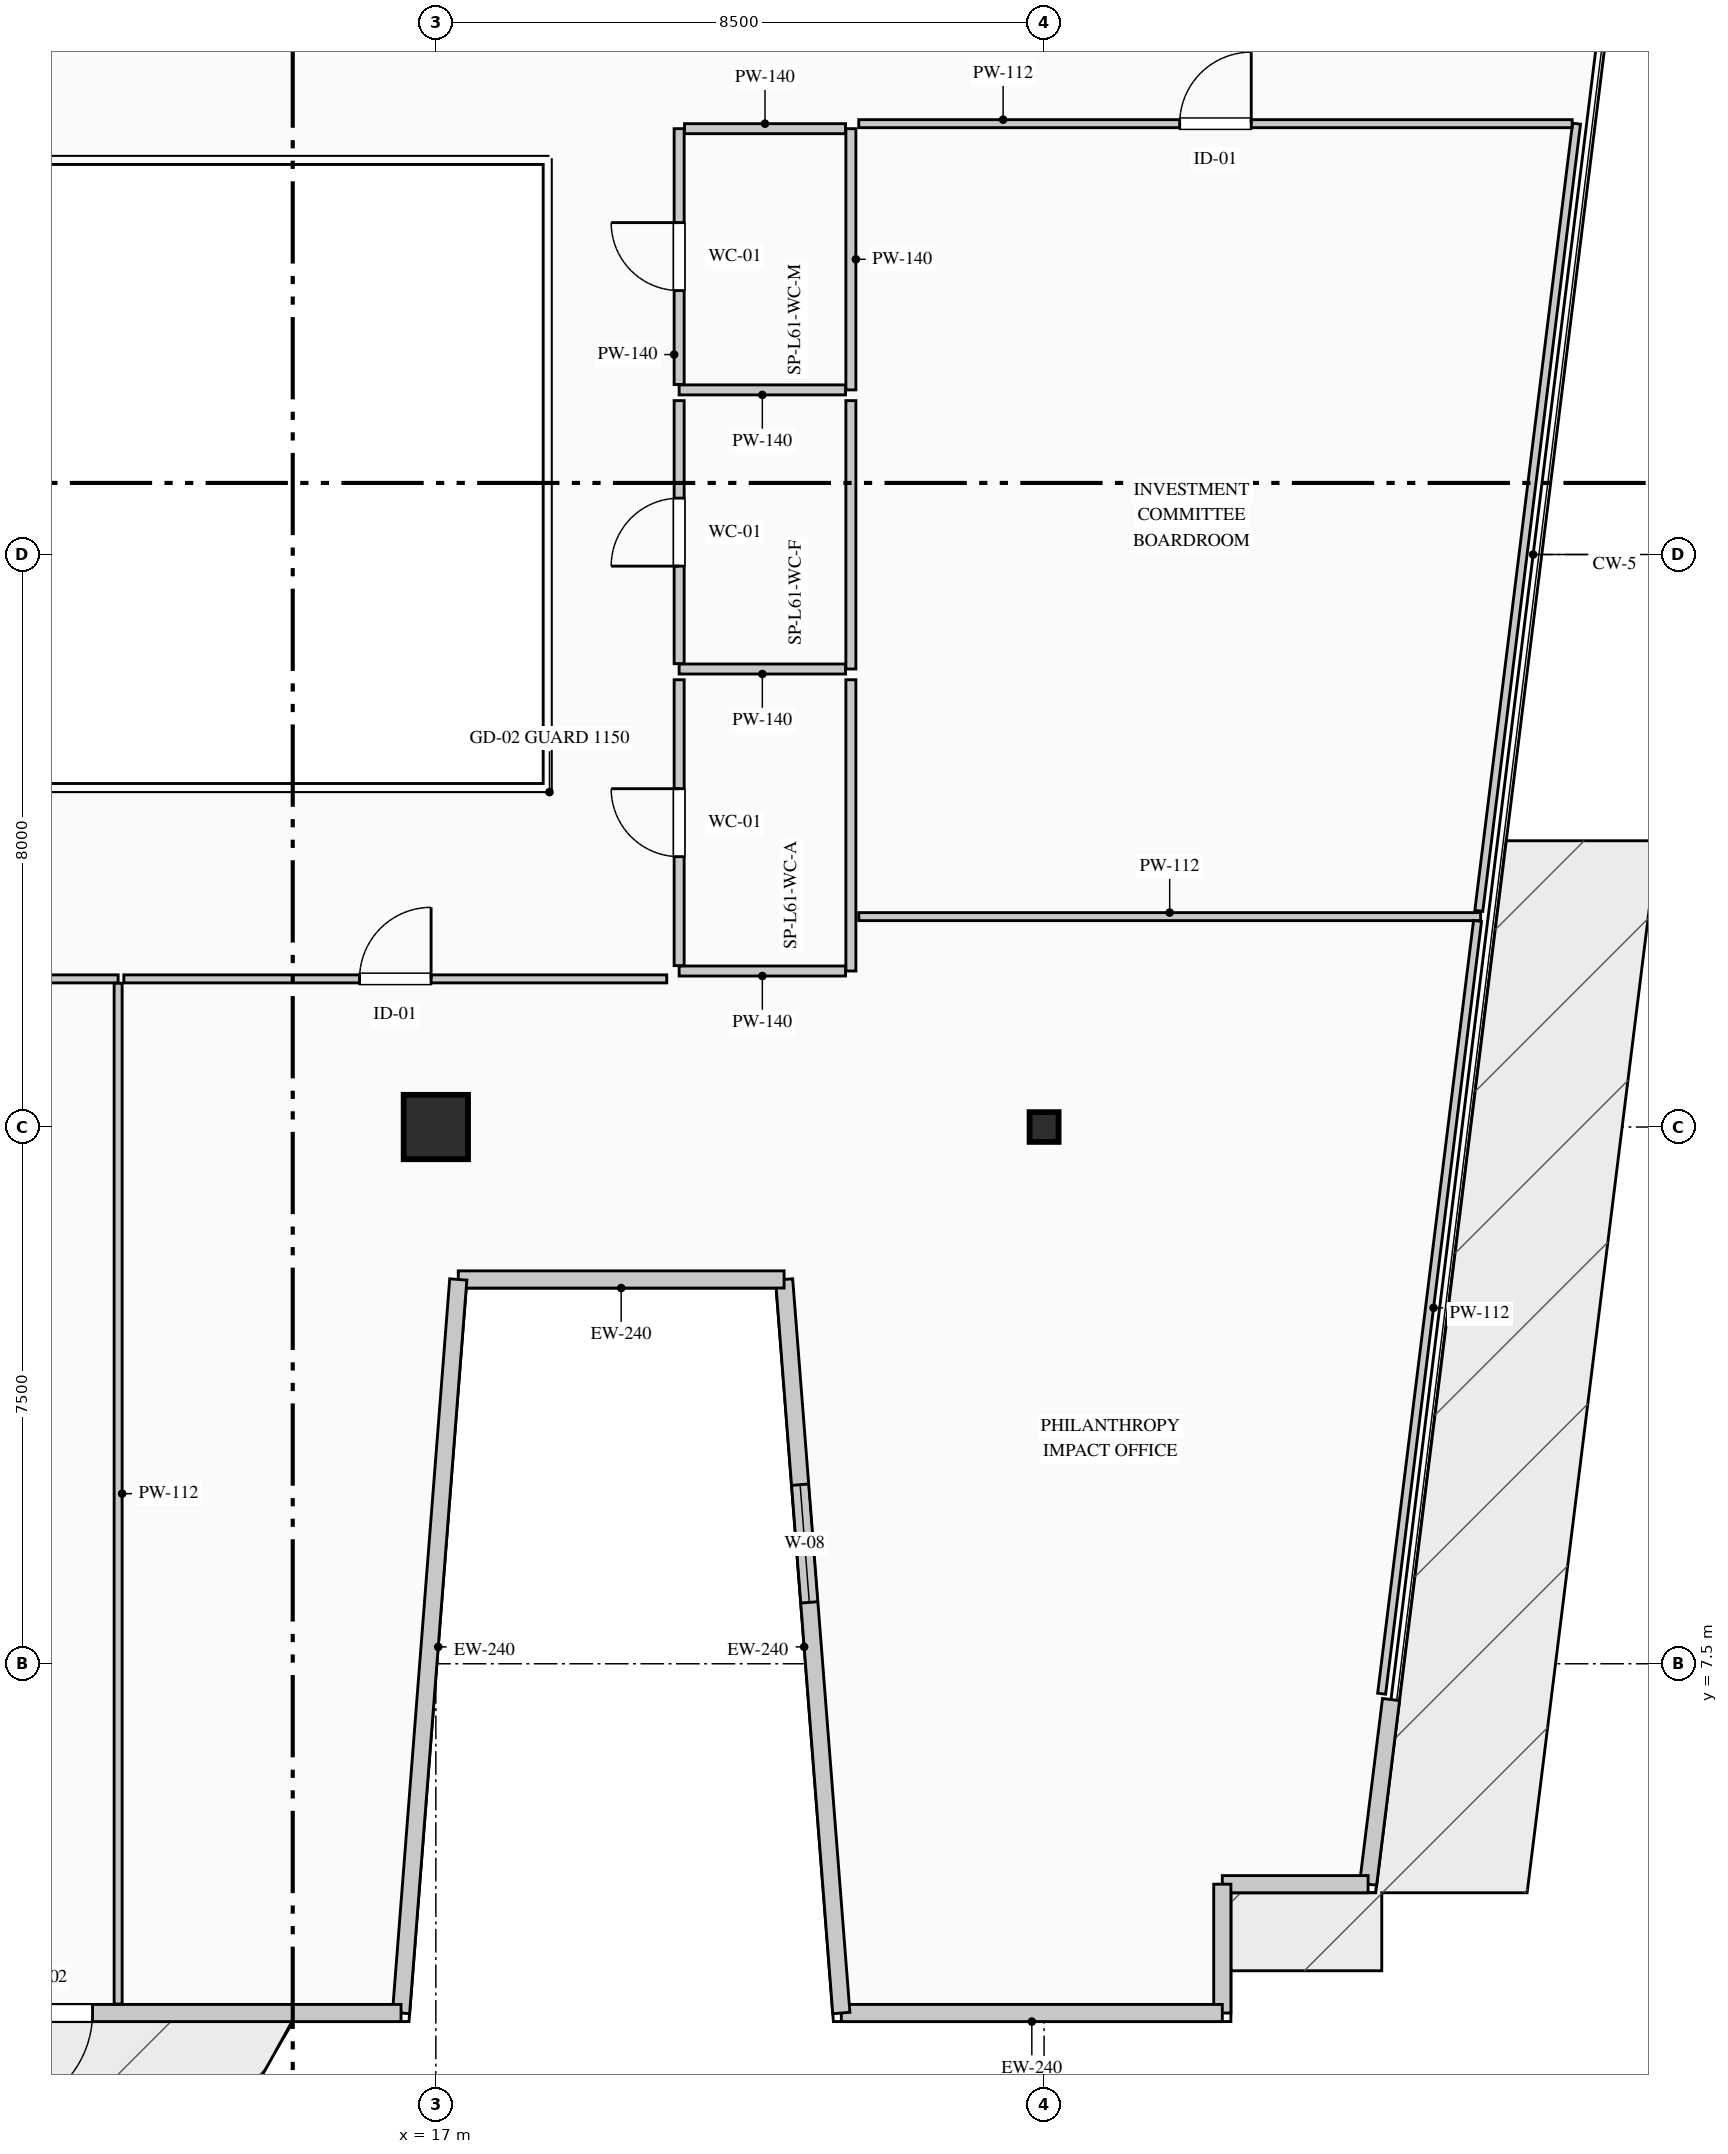
"""IFC4 building model, lengths in metres.
Left out: names, types, materials, properties, quantities, classifications, styles, units other than length and angle.
Written with IfcOpenShell. Run it as: python <this file> out.ifc"""

import sys

from ifc_helpers import new_model, si_unit, direction, frame, frame_2d, origin, origin_2d, place, context, subcontext, project, spatial, rectangle, i_section, extrude, element, fill, save


model = new_model("IFC4")
c1 = context("Model", 3, precision=1e-05, world=origin(), true_north=direction((0.0, 1.0)))
c2 = subcontext(c1, "Body", "Model", "MODEL_VIEW")
j1 = project(units=[si_unit("LENGTHUNIT", "METRE"), si_unit("PLANEANGLEUNIT", "RADIAN")], contexts=[c1])
p1 = place(None, origin())
s1 = spatial("IfcSite", under=j1, at=p1, CompositionType="ELEMENT")
p2 = place(p1, origin())
s2 = spatial("IfcBuilding", under=s1, at=p2, CompositionType="ELEMENT")
p3 = place(p2, frame((0.0, 0.0, 256.7)))
s3 = spatial("IfcBuildingStorey", under=s2, at=p3, CompositionType="ELEMENT", Elevation=256.7)
p4 = place(p3, frame((17.0, 15.0, 0.0), z_axis=(0.0, 0.0, 1.0), x_axis=(1.0, 0.0, 0.0)))
e1 = element("IfcColumn", 1, at=p4, inside=s3, PredefinedType="COLUMN", context=c2, shape_type="SweptSolid", body=[
    extrude(rectangle(XDim=0.9, YDim=0.9, at=origin_2d()), origin(), (0.0, 0.0, 1.0), 3.95),
])
p5 = place(p3, frame((25.5, 15.0, 0.0), z_axis=(0.0, 0.0, 1.0), x_axis=(1.0, 0.0, 0.0)))
e2 = element("IfcColumn", 2, at=p5, inside=s3, PredefinedType="COLUMN", context=c2, shape_type="SweptSolid", body=[
    extrude(i_section(OverallWidth=0.406, OverallDepth=0.416, WebThickness=0.03, FlangeThickness=0.048, FilletRadius=0.015, at=origin_2d()), origin(), (0.0, 0.0, 1.0), 3.95),
])
p6 = place(p3, frame((30.348, 7.0, 0.0), z_axis=(0.0, 0.0, 1.0), x_axis=(-0.123191073593, -0.992382970121, 0.0)))
e3 = element("IfcWall", 3, at=p6, inside=s3, PredefinedType="STANDARD", context=c2, shape_type="SweptSolid", body=[
    extrude(rectangle(XDim=2.6, YDim=0.24, at=frame_2d((1.3, 0.0))), origin(), (0.0, 0.0, 1.0), 3.7),
])
p7 = place(p3, frame((30.028, 4.42, 0.0), z_axis=(0.0, 0.0, 1.0), x_axis=(-1.0, 0.0, 0.0)))
e4 = element("IfcWall", 4, at=p7, inside=s3, PredefinedType="STANDARD", context=c2, shape_type="SweptSolid", body=[
    extrude(rectangle(XDim=2.037, YDim=0.24, at=frame_2d((1.019, 0.0))), origin(), (0.0, 0.0, 1.0), 3.7),
])
p8 = place(p3, frame((27.99, 4.42, 0.0), z_axis=(0.0, 0.0, 1.0), x_axis=(0.0, -1.0, 0.0)))
e5 = element("IfcWall", 5, at=p8, inside=s3, PredefinedType="STANDARD", context=c2, shape_type="SweptSolid", body=[
    extrude(rectangle(XDim=1.8, YDim=0.24, at=frame_2d((0.9, 0.0))), origin(), (0.0, 0.0, 1.0), 3.7),
])
p9 = place(p3, frame((27.99, 2.62, 0.0), z_axis=(0.0, 0.0, 1.0), x_axis=(-1.0, 0.0, 0.0)))
e6 = element("IfcWall", 6, at=p9, inside=s3, PredefinedType="STANDARD", context=c2, shape_type="SweptSolid", body=[
    extrude(rectangle(XDim=5.324, YDim=0.24, at=frame_2d((2.662, 0.0))), origin(), (0.0, 0.0, 1.0), 3.7),
])
p10 = place(p3, frame((22.667, 2.62, 0.0), z_axis=(0.0, 0.0, 1.0), x_axis=(-0.077816860153, 0.996967670627, 0.0)))
e7 = element("IfcWall", 7, at=p10, inside=s3, PredefinedType="STANDARD", context=c2, shape_type="SweptSolid", body=[
    extrude(rectangle(XDim=10.281, YDim=0.24, at=frame_2d((5.141, 0.0))), origin(), (0.0, 0.0, 1.0), 3.7),
])
p11 = place(p10, frame((5.755, 0.0, 0.9)))
e8 = element("IfcOpeningElement", 8, at=p11, cuts=e7, PredefinedType="OPENING", context=c2, shape_type="SweptSolid", body=[
    extrude(rectangle(XDim=1.65, YDim=1.95, at=frame_2d((0.825, 0.975))), frame((0.0, 0.13, 0.0), z_axis=(0.0, -1.0, 0.0), x_axis=(1.0, 0.0, 0.0)), (0.0, 0.0, 1.0), 0.26),
])
p12 = place(p3, frame((21.867, 12.87, 0.0), z_axis=(0.0, 0.0, 1.0), x_axis=(-1.0, 0.0, 0.0)))
e9 = element("IfcWall", 9, at=p12, inside=s3, PredefinedType="STANDARD", context=c2, shape_type="SweptSolid", body=[
    extrude(rectangle(XDim=4.553, YDim=0.24, at=frame_2d((2.277, 0.0))), origin(), (0.0, 0.0, 1.0), 3.7),
])
p13 = place(p3, frame((17.313, 12.87, 0.0), z_axis=(0.0, 0.0, 1.0), x_axis=(-0.077816860153, -0.996967670627, 0.0)))
e10 = element("IfcWall", 10, at=p13, inside=s3, PredefinedType="STANDARD", context=c2, shape_type="SweptSolid", body=[
    extrude(rectangle(XDim=10.281, YDim=0.24, at=frame_2d((5.141, 0.0))), origin(), (0.0, 0.0, 1.0), 3.7),
])
p14 = place(p3, frame((16.513, 2.62, 0.0), z_axis=(0.0, 0.0, 1.0), x_axis=(-1.0, 0.0, 0.0)))
e11 = element("IfcWall", 11, at=p14, inside=s3, PredefinedType="STANDARD", context=c2, shape_type="SweptSolid", body=[
    extrude(rectangle(XDim=8.408, YDim=0.24, at=frame_2d((4.204, 0.0))), origin(), (0.0, 0.0, 1.0), 3.7),
])
p15 = place(p14, frame((4.311, 0.0, 0.0)))
e12 = element("IfcOpeningElement", 12, at=p15, cuts=e11, PredefinedType="OPENING", context=c2, shape_type="SweptSolid", body=[
    extrude(rectangle(XDim=1.4, YDim=2.2, at=frame_2d((0.7, 1.1))), frame((0.0, 0.13, 0.0), z_axis=(0.0, -1.0, 0.0), x_axis=(1.0, 0.0, 0.0)), (0.0, 0.0, 1.0), 0.26),
])
p16 = place(p3, frame((22.8, 28.95, 0.0), z_axis=(0.0, 0.0, 1.0), x_axis=(0.0, -1.0, 0.0)))
e13 = element("IfcWall", 13, at=p16, inside=s3, PredefinedType="PARTITIONING", context=c2, shape_type="SweptSolid", body=[
    extrude(rectangle(XDim=3.65, YDim=0.14, at=frame_2d((1.825, 0.0))), origin(), (0.0, 0.0, 1.0), 3.385),
])
p17 = place(p3, frame((22.725, 25.3, 0.0), z_axis=(0.0, 0.0, 1.0), x_axis=(-1.0, 0.0, 0.0)))
e14 = element("IfcWall", 14, at=p17, inside=s3, PredefinedType="PARTITIONING", context=c2, shape_type="SweptSolid", body=[
    extrude(rectangle(XDim=2.325, YDim=0.14, at=frame_2d((1.163, 0.0))), origin(), (0.0, 0.0, 1.0), 3.7),
])
p18 = place(p3, frame((20.4, 25.375, 0.0), z_axis=(0.0, 0.0, 1.0), x_axis=(0.0, 1.0, 0.0)))
e15 = element("IfcWall", 15, at=p18, inside=s3, PredefinedType="PARTITIONING", context=c2, shape_type="SweptSolid", body=[
    extrude(rectangle(XDim=3.575, YDim=0.14, at=frame_2d((1.788, 0.0))), origin(), (0.0, 0.0, 1.0), 3.7),
])
p19 = place(p18, frame((1.312, 0.0, 0.0)))
e16 = element("IfcOpeningElement", 16, at=p19, cuts=e15, PredefinedType="OPENING", context=c2, shape_type="SweptSolid", body=[
    extrude(rectangle(XDim=0.95, YDim=2.15, at=frame_2d((0.475, 1.075))), frame((0.0, 0.08, 0.0), z_axis=(0.0, -1.0, 0.0), x_axis=(1.0, 0.0, 0.0)), (0.0, 0.0, 1.0), 0.16),
])
p20 = place(p3, frame((20.475, 28.95, 0.0), z_axis=(0.0, 0.0, 1.0), x_axis=(1.0, 0.0, 0.0)))
e17 = element("IfcWall", 17, at=p20, inside=s3, PredefinedType="PARTITIONING", context=c2, shape_type="SweptSolid", body=[
    extrude(rectangle(XDim=2.25, YDim=0.14, at=frame_2d((1.125, 0.0))), origin(), (0.0, 0.0, 1.0), 3.7),
])
p21 = place(p3, frame((22.8, 25.15, 0.0), z_axis=(0.0, 0.0, 1.0), x_axis=(0.0, -1.0, 0.0)))
e18 = element("IfcWall", 18, at=p21, inside=s3, PredefinedType="PARTITIONING", context=c2, shape_type="SweptSolid", body=[
    extrude(rectangle(XDim=3.75, YDim=0.14, at=frame_2d((1.875, 0.0))), origin(), (0.0, 0.0, 1.0), 3.385),
])
p22 = place(p3, frame((22.725, 21.4, 0.0), z_axis=(0.0, 0.0, 1.0), x_axis=(-1.0, 0.0, 0.0)))
e19 = element("IfcWall", 19, at=p22, inside=s3, PredefinedType="PARTITIONING", context=c2, shape_type="SweptSolid", body=[
    extrude(rectangle(XDim=2.325, YDim=0.14, at=frame_2d((1.163, 0.0))), origin(), (0.0, 0.0, 1.0), 3.7),
])
p23 = place(p3, frame((20.4, 21.475, 0.0), z_axis=(0.0, 0.0, 1.0), x_axis=(0.0, 1.0, 0.0)))
e20 = element("IfcWall", 20, at=p23, inside=s3, PredefinedType="PARTITIONING", context=c2, shape_type="SweptSolid", body=[
    extrude(rectangle(XDim=3.675, YDim=0.14, at=frame_2d((1.837, 0.0))), origin(), (0.0, 0.0, 1.0), 3.7),
])
p24 = place(p23, frame((1.363, 0.0, 0.0)))
e21 = element("IfcOpeningElement", 21, at=p24, cuts=e20, PredefinedType="OPENING", context=c2, shape_type="SweptSolid", body=[
    extrude(rectangle(XDim=0.95, YDim=2.15, at=frame_2d((0.475, 1.075))), frame((0.0, 0.08, 0.0), z_axis=(0.0, -1.0, 0.0), x_axis=(1.0, 0.0, 0.0)), (0.0, 0.0, 1.0), 0.16),
])
p25 = place(p3, frame((22.8, 21.25, 0.0), z_axis=(0.0, 0.0, 1.0), x_axis=(0.0, -1.0, 0.0)))
e22 = element("IfcWall", 22, at=p25, inside=s3, PredefinedType="PARTITIONING", context=c2, shape_type="SweptSolid", body=[
    extrude(rectangle(XDim=4.07, YDim=0.14, at=frame_2d((2.035, 0.0))), origin(), (0.0, 0.0, 1.0), 3.385),
])
p26 = place(p3, frame((22.725, 17.18, 0.0), z_axis=(0.0, 0.0, 1.0), x_axis=(-1.0, 0.0, 0.0)))
e23 = element("IfcWall", 23, at=p26, inside=s3, PredefinedType="PARTITIONING", context=c2, shape_type="SweptSolid", body=[
    extrude(rectangle(XDim=2.325, YDim=0.14, at=frame_2d((1.163, 0.0))), origin(), (0.0, 0.0, 1.0), 3.7),
])
p27 = place(p3, frame((20.4, 17.255, 0.0), z_axis=(0.0, 0.0, 1.0), x_axis=(0.0, 1.0, 0.0)))
e24 = element("IfcWall", 24, at=p27, inside=s3, PredefinedType="PARTITIONING", context=c2, shape_type="SweptSolid", body=[
    extrude(rectangle(XDim=3.995, YDim=0.14, at=frame_2d((1.998, 0.0))), origin(), (0.0, 0.0, 1.0), 3.7),
])
p28 = place(p27, frame((1.522, 0.0, 0.0)))
e25 = element("IfcOpeningElement", 25, at=p28, cuts=e24, PredefinedType="OPENING", context=c2, shape_type="SweptSolid", body=[
    extrude(rectangle(XDim=0.95, YDim=2.15, at=frame_2d((0.475, 1.075))), frame((0.0, 0.08, 0.0), z_axis=(0.0, -1.0, 0.0), x_axis=(1.0, 0.0, 0.0)), (0.0, 0.0, 1.0), 0.16),
])
p29 = place(p3, frame((5.122, 17.07, 0.0), z_axis=(0.0, 0.0, 1.0), x_axis=(1.0, 0.0, 0.0)))
e26 = element("IfcWall", 26, at=p29, inside=s3, PredefinedType="PARTITIONING", context=c2, shape_type="SweptSolid", body=[
    extrude(rectangle(XDim=7.438, YDim=0.112, at=frame_2d((3.719, 0.0))), origin(), (0.0, 0.0, 1.0), 3.7),
])
p30 = place(p29, frame((3.219, 0.0, 0.0)))
e27 = element("IfcOpeningElement", 27, at=p30, cuts=e26, PredefinedType="OPENING", context=c2, shape_type="SweptSolid", body=[
    extrude(rectangle(XDim=1.0, YDim=2.15, at=frame_2d((0.5, 1.075))), frame((0.0, 0.066, 0.0), z_axis=(0.0, -1.0, 0.0), x_axis=(1.0, 0.0, 0.0)), (0.0, 0.0, 1.0), 0.132),
])
p31 = place(p3, frame((12.56, 17.009, 0.0), z_axis=(0.0, 0.0, 1.0), x_axis=(0.0, -1.0, 0.0)))
e28 = element("IfcWall", 28, at=p31, inside=s3, PredefinedType="PARTITIONING", context=c2, shape_type="SweptSolid", body=[
    extrude(rectangle(XDim=14.264, YDim=0.112, at=frame_2d((7.132, 0.0))), origin(), (0.0, 0.0, 1.0), 3.7),
])
p32 = place(p3, frame((22.91, 17.94, 0.0), z_axis=(0.0, 0.0, 1.0), x_axis=(1.0, 0.0, 0.0)))
e29 = element("IfcWall", 29, at=p32, inside=s3, PredefinedType="PARTITIONING", context=c2, shape_type="SweptSolid", body=[
    extrude(rectangle(XDim=8.69, YDim=0.112, at=frame_2d((4.345, 0.0))), origin(), (0.0, 0.0, 1.0), 3.7),
])
p33 = place(p3, frame((31.557, 17.879, 0.0), z_axis=(0.0, 0.0, 1.0), x_axis=(-0.12319234905, -0.99238281179, 0.0)))
e30 = element("IfcWall", 30, at=p33, inside=s3, PredefinedType="PARTITIONING", context=c2, shape_type="SweptSolid", body=[
    extrude(rectangle(XDim=10.88, YDim=0.112, at=frame_2d((5.44, 0.0))), origin(), (0.0, 0.0, 1.0), 3.7),
])
p34 = place(p3, frame((12.64, 17.07, 0.0), z_axis=(0.0, 0.0, 1.0), x_axis=(1.0, 0.0, 0.0)))
e31 = element("IfcWall", 31, at=p34, inside=s3, PredefinedType="PARTITIONING", context=c2, shape_type="SweptSolid", body=[
    extrude(rectangle(XDim=7.587, YDim=0.112, at=frame_2d((3.793, 0.0))), origin(), (0.0, 0.0, 1.0), 3.7),
])
p35 = place(p34, frame((3.293, 0.0, 0.0)))
e32 = element("IfcOpeningElement", 32, at=p35, cuts=e31, PredefinedType="OPENING", context=c2, shape_type="SweptSolid", body=[
    extrude(rectangle(XDim=1.0, YDim=2.15, at=frame_2d((0.5, 1.075))), frame((0.0, 0.066, 0.0), z_axis=(0.0, -1.0, 0.0), x_axis=(1.0, 0.0, 0.0)), (0.0, 0.0, 1.0), 0.132),
])
p36 = place(p3, frame((32.941, 29.02, 0.0), z_axis=(0.0, 0.0, 1.0), x_axis=(-0.123232290614, -0.99237785271, 0.0)))
e33 = element("IfcWall", 33, at=p36, inside=s3, PredefinedType="PARTITIONING", context=c2, shape_type="SweptSolid", body=[
    extrude(rectangle(XDim=11.084, YDim=0.112, at=frame_2d((5.542, 0.0))), origin(), (0.0, 0.0, 1.0), 3.7),
])
p37 = place(p3, frame((22.91, 29.02, 0.0), z_axis=(0.0, 0.0, 1.0), x_axis=(1.0, 0.0, 0.0)))
e34 = element("IfcWall", 34, at=p37, inside=s3, PredefinedType="PARTITIONING", context=c2, shape_type="SweptSolid", body=[
    extrude(rectangle(XDim=9.969, YDim=0.112, at=frame_2d((4.985, 0.0))), origin(), (0.0, 0.0, 1.0), 3.7),
])
p38 = place(p37, frame((4.485, 0.0, 0.0)))
e35 = element("IfcOpeningElement", 35, at=p38, cuts=e34, PredefinedType="OPENING", context=c2, shape_type="SweptSolid", body=[
    extrude(rectangle(XDim=1.0, YDim=2.15, at=frame_2d((0.5, 1.075))), frame((0.0, 0.066, 0.0), z_axis=(0.0, -1.0, 0.0), x_axis=(1.0, 0.0, 0.0)), (0.0, 0.0, 1.0), 0.132),
])
p39 = place(p11, origin())
e36 = element("IfcWindow", 36, at=p39, inside=s3, PartitioningType="SINGLE_PANEL", PredefinedType="WINDOW", context=c2, shape_type="SweptSolid", body=[
    extrude(rectangle(XDim=1.65, YDim=1.95, at=frame_2d((0.825, 0.975))), frame((0.0, 0.03, 0.0), z_axis=(0.0, -1.0, 0.0), x_axis=(1.0, 0.0, 0.0)), (0.0, 0.0, 1.0), 0.06),
])
fill(e8, e36)
p40 = place(p15, origin())
e37 = element("IfcDoor", 37, at=p40, inside=s3, OperationType="SINGLE_SWING_RIGHT", PredefinedType="DOOR", context=c2, shape_type="SweptSolid", body=[
    extrude(rectangle(XDim=1.4, YDim=2.2, at=frame_2d((0.7, 1.1))), frame((0.0, 0.025, 0.0), z_axis=(0.0, -1.0, 0.0), x_axis=(1.0, 0.0, 0.0)), (0.0, 0.0, 1.0), 0.05),
])
fill(e12, e37)
p41 = place(p19, origin())
e38 = element("IfcDoor", 38, at=p41, inside=s3, OperationType="SINGLE_SWING_RIGHT", PredefinedType="DOOR", context=c2, shape_type="SweptSolid", body=[
    extrude(rectangle(XDim=0.95, YDim=2.15, at=frame_2d((0.475, 1.075))), frame((0.0, 0.025, 0.0), z_axis=(0.0, -1.0, 0.0), x_axis=(1.0, 0.0, 0.0)), (0.0, 0.0, 1.0), 0.05),
])
fill(e16, e38)
p42 = place(p24, origin())
e39 = element("IfcDoor", 39, at=p42, inside=s3, OperationType="SINGLE_SWING_LEFT", PredefinedType="DOOR", context=c2, shape_type="SweptSolid", body=[
    extrude(rectangle(XDim=0.95, YDim=2.15, at=frame_2d((0.475, 1.075))), frame((0.0, 0.025, 0.0), z_axis=(0.0, -1.0, 0.0), x_axis=(1.0, 0.0, 0.0)), (0.0, 0.0, 1.0), 0.05),
])
fill(e21, e39)
p43 = place(p28, origin())
e40 = element("IfcDoor", 40, at=p43, inside=s3, OperationType="SINGLE_SWING_RIGHT", PredefinedType="DOOR", context=c2, shape_type="SweptSolid", body=[
    extrude(rectangle(XDim=0.95, YDim=2.15, at=frame_2d((0.475, 1.075))), frame((0.0, 0.025, 0.0), z_axis=(0.0, -1.0, 0.0), x_axis=(1.0, 0.0, 0.0)), (0.0, 0.0, 1.0), 0.05),
])
fill(e25, e40)
p44 = place(p35, origin())
e41 = element("IfcDoor", 41, at=p44, inside=s3, OperationType="SINGLE_SWING_RIGHT", PredefinedType="DOOR", context=c2, shape_type="SweptSolid", body=[
    extrude(rectangle(XDim=1.0, YDim=2.15, at=frame_2d((0.5, 1.075))), frame((0.0, 0.025, 0.0), z_axis=(0.0, -1.0, 0.0), x_axis=(1.0, 0.0, 0.0)), (0.0, 0.0, 1.0), 0.05),
])
fill(e32, e41)
p45 = place(p38, origin())
e42 = element("IfcDoor", 42, at=p45, inside=s3, OperationType="SINGLE_SWING_RIGHT", PredefinedType="DOOR", context=c2, shape_type="SweptSolid", body=[
    extrude(rectangle(XDim=1.0, YDim=2.15, at=frame_2d((0.5, 1.075))), frame((0.0, 0.025, 0.0), z_axis=(0.0, -1.0, 0.0), x_axis=(1.0, 0.0, 0.0)), (0.0, 0.0, 1.0), 0.05),
])
fill(e35, e42)
save(model, sys.argv[1])
